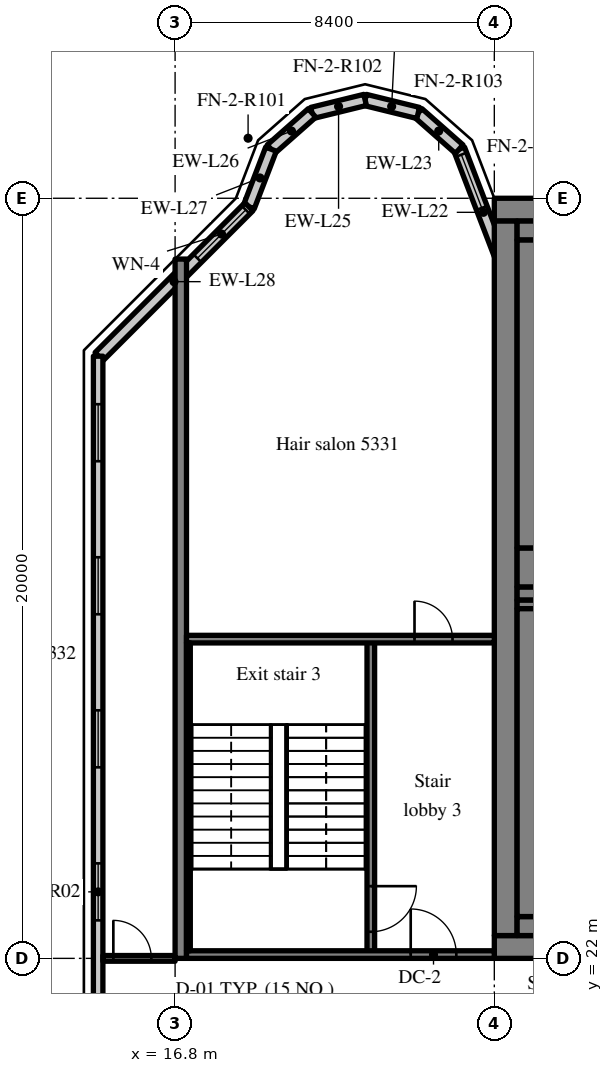
"""IFC4 building model, lengths in metres.
Left out: names, types, materials, properties, quantities, classifications, styles, units other than length and angle.
Written with IfcOpenShell. Run it as: python <this file> out.ifc"""

import sys

from ifc_helpers import new_model, si_unit, direction, frame, frame_2d, origin, place, context, subcontext, project, spatial, rectangle, extrude, source, transform, mapped, element, fill, save


model = new_model("IFC4")
c1 = context("Model", 3, precision=1e-05, world=origin(), true_north=direction((0.0, 1.0)))
c2 = subcontext(c1, "Body", "Model", "MODEL_VIEW")
j1 = project(units=[si_unit("LENGTHUNIT", "METRE"), si_unit("PLANEANGLEUNIT", "RADIAN")], contexts=[c1])
p1 = place(None, origin())
s1 = spatial("IfcSite", under=j1, at=p1, CompositionType="ELEMENT")
p2 = place(p1, origin())
s2 = spatial("IfcBuilding", under=s1, at=p2, CompositionType="ELEMENT")
p3 = place(p2, frame((0.0, 0.0, 221.8)))
s3 = spatial("IfcBuildingStorey", under=s2, at=p3, CompositionType="ELEMENT", Elevation=221.8)
m1 = source(origin(), c2, "Body", "SweptSolid", [
    extrude(rectangle(XDim=50.4, YDim=0.6, at=frame_2d((25.2, 0.0))), origin(), (0.0, 0.0, 1.0), 3.62),
])
p4 = place(p3, frame((25.2, 22.3, 0.0), z_axis=(0.0, 0.0, 1.0), x_axis=(1.0, 0.0, 0.0)))
e1 = element("IfcWall", 1, at=p4, inside=s3, PredefinedType="SHEAR", context=c2, shape_type="MappedRepresentation", body=[
    mapped(m1, transform((0.0, 0.0, 0.0), scale=1.0)),
])
m2 = source(origin(), c2, "Body", "SweptSolid", [
    extrude(rectangle(XDim=1.8, YDim=2.1, at=frame_2d((0.9, 1.05))), frame((0.0, 0.31, 0.0), z_axis=(0.0, -1.0, 0.0), x_axis=(1.0, 0.0, 0.0)), (0.0, 0.0, 1.0), 0.62),
])
p5 = place(p4, frame((15.9, 0.0, 0.0)))
e2 = element("IfcOpeningElement", 2, at=p5, cuts=e1, PredefinedType="OPENING", context=c2, shape_type="MappedRepresentation", body=[
    mapped(m2, transform((0.0, 0.0, 0.0), scale=1.0)),
])
m3 = source(origin(), c2, "Body", "SweptSolid", [
    extrude(rectangle(XDim=0.9, YDim=2.1, at=frame_2d((0.45, 1.05))), frame((0.0, 0.31, 0.0), z_axis=(0.0, -1.0, 0.0), x_axis=(1.0, 0.0, 0.0)), (0.0, 0.0, 1.0), 0.62),
])
p6 = place(p4, frame((9.687, 0.0, 0.0)))
e3 = element("IfcOpeningElement", 3, at=p6, cuts=e1, PredefinedType="OPENING", context=c2, shape_type="MappedRepresentation", body=[
    mapped(m3, transform((0.0, 0.0, 0.0), scale=1.0)),
])
p7 = place(p4, frame((21.513, 0.0, 0.0)))
e4 = element("IfcOpeningElement", 4, at=p7, cuts=e1, PredefinedType="OPENING", context=c2, shape_type="MappedRepresentation", body=[
    mapped(m3, transform((0.0, 0.0, 0.0), scale=1.0)),
])
p8 = place(p4, frame((32.7, 0.0, 0.0)))
e5 = element("IfcOpeningElement", 5, at=p8, cuts=e1, PredefinedType="OPENING", context=c2, shape_type="MappedRepresentation", body=[
    mapped(m2, transform((0.0, 0.0, 0.0), scale=1.0)),
])
m4 = source(origin(), c2, "Body", "SweptSolid", [
    extrude(rectangle(XDim=1.2, YDim=2.1, at=frame_2d((0.6, 1.05))), frame((0.0, 0.31, 0.0), z_axis=(0.0, -1.0, 0.0), x_axis=(1.0, 0.0, 0.0)), (0.0, 0.0, 1.0), 0.62),
])
p9 = place(p4, frame((6.488, 0.0, 0.0)))
e6 = element("IfcOpeningElement", 6, at=p9, cuts=e1, PredefinedType="OPENING", context=c2, shape_type="MappedRepresentation", body=[
    mapped(m4, transform((0.0, 0.0, 0.0), scale=1.0)),
])
p10 = place(p4, frame((47.925, 0.0, 0.0)))
e7 = element("IfcOpeningElement", 7, at=p10, cuts=e1, PredefinedType="OPENING", context=c2, shape_type="MappedRepresentation", body=[
    mapped(m4, transform((0.0, 0.0, 0.0), scale=1.0)),
])
p11 = place(p3, frame((25.2, 41.7, 0.0), z_axis=(0.0, 0.0, 1.0), x_axis=(1.0, 0.0, 0.0)))
e8 = element("IfcWall", 8, at=p11, inside=s3, PredefinedType="SHEAR", context=c2, shape_type="MappedRepresentation", body=[
    mapped(m1, transform((0.0, 0.0, 0.0), scale=1.0)),
])
m5 = source(origin(), c2, "Body", "SweptSolid", [
    extrude(rectangle(XDim=18.8, YDim=0.6, at=frame_2d((9.4, 0.0))), origin(), (0.0, 0.0, 1.0), 3.62),
])
p12 = place(p3, frame((25.5, 22.6, 0.0), z_axis=(0.0, 0.0, 1.0), x_axis=(0.0, 1.0, 0.0)))
e9 = element("IfcWall", 9, at=p12, inside=s3, PredefinedType="SHEAR", context=c2, shape_type="MappedRepresentation", body=[
    mapped(m5, transform((0.0, 0.0, 0.0), scale=1.0)),
])
m6 = source(origin(), c2, "Body", "SweptSolid", [
    extrude(rectangle(XDim=7.625, YDim=0.35, at=frame_2d((3.812, 0.0))), origin(), (0.0, 0.0, 1.0), 3.62),
])
p13 = place(p3, frame((25.8, 31.6, 0.0), z_axis=(0.0, 0.0, 1.0), x_axis=(1.0, 0.0, 0.0)))
e10 = element("IfcWall", 10, at=p13, inside=s3, PredefinedType="SHEAR", context=c2, shape_type="MappedRepresentation", body=[
    mapped(m6, transform((0.0, 0.0, 0.0), scale=1.0)),
])
m7 = source(origin(), c2, "Body", "SweptSolid", [
    extrude(rectangle(XDim=1.1, YDim=2.1, at=frame_2d((0.55, 1.05))), frame((0.0, 0.185, 0.0), z_axis=(0.0, -1.0, 0.0), x_axis=(1.0, 0.0, 0.0)), (0.0, 0.0, 1.0), 0.37),
])
p14 = place(p13, frame((5.938, 0.0, 0.0)))
e11 = element("IfcOpeningElement", 11, at=p14, cuts=e10, PredefinedType="OPENING", context=c2, shape_type="MappedRepresentation", body=[
    mapped(m7, transform((0.0, 0.0, 0.0), scale=1.0)),
])
m8 = source(origin(), c2, "Body", "SweptSolid", [
    extrude(rectangle(XDim=18.4, YDim=0.3, at=frame_2d((9.2, 0.0))), origin(), (0.0, 0.0, 1.0), 3.62),
])
p15 = place(p3, frame((16.95, 22.0, 0.0), z_axis=(0.0, 0.0, 1.0), x_axis=(0.0, 1.0, 0.0)))
e12 = element("IfcWall", 12, at=p15, inside=s3, PredefinedType="SHEAR", context=c2, shape_type="MappedRepresentation", body=[
    mapped(m8, transform((0.0, 0.0, 0.0), scale=1.0)),
])
m9 = source(origin(), c2, "Body", "SweptSolid", [
    extrude(rectangle(XDim=3.559, YDim=0.3, at=frame_2d((1.78, 0.0))), origin(), (0.0, 0.0, 1.0), 3.62),
])
p16 = place(p3, frame((25.55, 39.969, 0.0), z_axis=(0.0, 0.0, 1.0), x_axis=(-0.35779745313, 0.933799219604, 0.0)))
e13 = element("IfcWall", 13, at=p16, inside=s3, PredefinedType="SOLIDWALL", context=c2, shape_type="MappedRepresentation", body=[
    mapped(m9, transform((0.0, 0.0, 0.0), scale=1.0)),
])
m10 = source(origin(), c2, "Body", "SweptSolid", [
    extrude(rectangle(XDim=1.5, YDim=2.0, at=frame_2d((0.75, 1.0))), frame((0.0, 0.16, 0.0), z_axis=(0.0, -1.0, 0.0), x_axis=(1.0, 0.0, 0.0)), (0.0, 0.0, 1.0), 0.32),
])
p17 = place(p16, frame((1.903, 0.0, 0.9)))
e14 = element("IfcOpeningElement", 14, at=p17, cuts=e13, PredefinedType="OPENING", context=c2, shape_type="MappedRepresentation", body=[
    mapped(m10, transform((0.0, 0.0, 0.0), scale=1.0)),
])
m11 = source(origin(), c2, "Body", "SweptSolid", [
    extrude(rectangle(XDim=1.44, YDim=0.3, at=frame_2d((0.72, 0.0))), origin(), (0.0, 0.0, 1.0), 3.62),
])
p18 = place(p3, frame((24.277, 43.292, 0.0), z_axis=(0.0, 0.0, 1.0), x_axis=(-0.749649827867, 0.661834673902, 0.0)))
e15 = element("IfcWall", 15, at=p18, inside=s3, PredefinedType="SOLIDWALL", context=c2, shape_type="MappedRepresentation", body=[
    mapped(m11, transform((0.0, 0.0, 0.0), scale=1.0)),
])
m12 = source(origin(), c2, "Body", "SweptSolid", [
    extrude(rectangle(XDim=1.438, YDim=0.3, at=frame_2d((0.719, 0.0))), origin(), (0.0, 0.0, 1.0), 3.62),
])
p19 = place(p3, frame((23.197, 44.245, 0.0), z_axis=(0.0, 0.0, 1.0), x_axis=(-0.971152283879, 0.238460146601, 0.0)))
e16 = element("IfcWall", 16, at=p19, inside=s3, PredefinedType="SOLIDWALL", context=c2, shape_type="MappedRepresentation", body=[
    mapped(m12, transform((0.0, 0.0, 0.0), scale=1.0)),
])
m13 = source(origin(), c2, "Body", "SweptSolid", [
    extrude(rectangle(XDim=1.439, YDim=0.3, at=frame_2d((0.719, 0.0))), origin(), (0.0, 0.0, 1.0), 3.62),
])
p20 = place(p3, frame((21.8, 44.588, 0.0), z_axis=(0.0, 0.0, 1.0), x_axis=(-0.971161932466, -0.238420848351, 0.0)))
e17 = element("IfcWall", 17, at=p20, inside=s3, PredefinedType="SOLIDWALL", context=c2, shape_type="MappedRepresentation", body=[
    mapped(m13, transform((0.0, 0.0, 0.0), scale=1.0)),
])
m14 = source(origin(), c2, "Body", "SweptSolid", [
    extrude(rectangle(XDim=1.44, YDim=0.3, at=frame_2d((0.72, 0.0))), origin(), (0.0, 0.0, 1.0), 3.62),
])
p21 = place(p3, frame((20.403, 44.245, 0.0), z_axis=(0.0, 0.0, 1.0), x_axis=(-0.74957555648, -0.661918790432, 0.0)))
e18 = element("IfcWall", 18, at=p21, inside=s3, PredefinedType="SOLIDWALL", context=c2, shape_type="MappedRepresentation", body=[
    mapped(m14, transform((0.0, 0.0, 0.0), scale=1.0)),
])
m15 = source(origin(), c2, "Body", "SweptSolid", [
    extrude(rectangle(XDim=1.622, YDim=0.3, at=frame_2d((0.811, 0.0))), origin(), (0.0, 0.0, 1.0), 3.62),
])
p22 = place(p3, frame((19.323, 43.292, 0.0), z_axis=(0.0, 0.0, 1.0), x_axis=(-0.357778527068, -0.933806471154, 0.0)))
e19 = element("IfcWall", 19, at=p22, inside=s3, PredefinedType="SOLIDWALL", context=c2, shape_type="MappedRepresentation", body=[
    mapped(m15, transform((0.0, 0.0, 0.0), scale=1.0)),
])
m16 = source(origin(), c2, "Body", "SweptSolid", [
    extrude(rectangle(XDim=5.576, YDim=0.3, at=frame_2d((2.788, 0.0))), origin(), (0.0, 0.0, 1.0), 3.62),
])
p23 = place(p3, frame((18.743, 41.777, 0.0), z_axis=(0.0, 0.0, 1.0), x_axis=(-0.707106781187, -0.707106781187, 0.0)))
e20 = element("IfcWall", 20, at=p23, inside=s3, PredefinedType="SOLIDWALL", context=c2, shape_type="MappedRepresentation", body=[
    mapped(m16, transform((0.0, 0.0, 0.0), scale=1.0)),
])
m17 = source(origin(), c2, "Body", "SweptSolid", [
    extrude(rectangle(XDim=1.8, YDim=1.5, at=frame_2d((0.9, 0.75))), frame((0.0, 0.16, 0.0), z_axis=(0.0, -1.0, 0.0), x_axis=(1.0, 0.0, 0.0)), (0.0, 0.0, 1.0), 0.32),
])
p24 = place(p23, frame((0.118, 0.0, 0.9)))
e21 = element("IfcOpeningElement", 21, at=p24, cuts=e20, PredefinedType="OPENING", context=c2, shape_type="MappedRepresentation", body=[
    mapped(m17, transform((0.0, 0.0, 0.0), scale=1.0)),
])
m18 = source(origin(), c2, "Body", "SweptSolid", [
    extrude(rectangle(XDim=28.189, YDim=0.25, at=frame_2d((14.095, 0.0))), origin(), (0.0, 0.0, 1.0), 3.62),
])
p25 = place(p3, frame((14.775, 37.845, 0.0), z_axis=(0.0, 0.0, 1.0), x_axis=(0.0, -1.0, 0.0)))
e22 = element("IfcWall", 22, at=p25, inside=s3, PredefinedType="SOLIDWALL", context=c2, shape_type="MappedRepresentation", body=[
    mapped(m18, transform((0.0, 0.0, 0.0), scale=1.0)),
])
m19 = source(origin(), c2, "Body", "SweptSolid", [
    extrude(rectangle(XDim=1.5, YDim=1.5, at=frame_2d((0.75, 0.75))), frame((0.0, 0.135, 0.0), z_axis=(0.0, -1.0, 0.0), x_axis=(1.0, 0.0, 0.0)), (0.0, 0.0, 1.0), 0.27),
])
p26 = place(p25, frame((1.263, 0.0, 0.9)))
e23 = element("IfcOpeningElement", 23, at=p26, cuts=e22, PredefinedType="OPENING", context=c2, shape_type="MappedRepresentation", body=[
    mapped(m19, transform((0.0, 0.0, 0.0), scale=1.0)),
])
p27 = place(p25, frame((5.291, 0.0, 0.9)))
e24 = element("IfcOpeningElement", 24, at=p27, cuts=e22, PredefinedType="OPENING", context=c2, shape_type="MappedRepresentation", body=[
    mapped(m19, transform((0.0, 0.0, 0.0), scale=1.0)),
])
p28 = place(p25, frame((9.318, 0.0, 0.9)))
e25 = element("IfcOpeningElement", 25, at=p28, cuts=e22, PredefinedType="OPENING", context=c2, shape_type="MappedRepresentation", body=[
    mapped(m19, transform((0.0, 0.0, 0.0), scale=1.0)),
])
p29 = place(p25, frame((13.345, 0.0, 0.9)))
e26 = element("IfcOpeningElement", 26, at=p29, cuts=e22, PredefinedType="OPENING", context=c2, shape_type="MappedRepresentation", body=[
    mapped(m19, transform((0.0, 0.0, 0.0), scale=1.0)),
])
p30 = place(p25, frame((17.372, 0.0, 0.9)))
e27 = element("IfcOpeningElement", 27, at=p30, cuts=e22, PredefinedType="OPENING", context=c2, shape_type="MappedRepresentation", body=[
    mapped(m19, transform((0.0, 0.0, 0.0), scale=1.0)),
])
p31 = place(p25, frame((21.399, 0.0, 0.9)))
e28 = element("IfcOpeningElement", 28, at=p31, cuts=e22, PredefinedType="OPENING", context=c2, shape_type="MappedRepresentation", body=[
    mapped(m19, transform((0.0, 0.0, 0.0), scale=1.0)),
])
p32 = place(p25, frame((25.426, 0.0, 0.9)))
e29 = element("IfcOpeningElement", 29, at=p32, cuts=e22, PredefinedType="OPENING", context=c2, shape_type="MappedRepresentation", body=[
    mapped(m19, transform((0.0, 0.0, 0.0), scale=1.0)),
])
m20 = source(origin(), c2, "Body", "SweptSolid", [
    extrude(rectangle(XDim=8.3, YDim=0.2, at=frame_2d((4.15, 0.0))), origin(), (0.0, 0.0, 1.0), 3.62),
])
p33 = place(p3, frame((21.95, 22.1, 0.0), z_axis=(0.0, 0.0, 1.0), x_axis=(0.0, 1.0, 0.0)))
e30 = element("IfcWall", 30, at=p33, inside=s3, PredefinedType="SOLIDWALL", context=c2, shape_type="MappedRepresentation", body=[
    mapped(m20, transform((0.0, 0.0, 0.0), scale=1.0)),
])
m21 = source(origin(), c2, "Body", "SweptSolid", [
    extrude(rectangle(XDim=1.2, YDim=2.1, at=frame_2d((0.6, 1.05))), frame((0.0, 0.11, 0.0), z_axis=(0.0, -1.0, 0.0), x_axis=(1.0, 0.0, 0.0)), (0.0, 0.0, 1.0), 0.22),
])
p34 = place(p33, frame((0.6, 0.0, 0.0)))
e31 = element("IfcOpeningElement", 31, at=p34, cuts=e30, PredefinedType="OPENING", context=c2, shape_type="MappedRepresentation", body=[
    mapped(m21, transform((0.0, 0.0, 0.0), scale=1.0)),
])
m22 = source(origin(), c2, "Body", "SweptSolid", [
    extrude(rectangle(XDim=8.1, YDim=0.2, at=frame_2d((4.05, 0.0))), origin(), (0.0, 0.0, 1.0), 3.62),
])
p35 = place(p3, frame((17.1, 22.1, 0.0), z_axis=(0.0, 0.0, 1.0), x_axis=(1.0, 0.0, 0.0)))
e32 = element("IfcWall", 32, at=p35, inside=s3, PredefinedType="SOLIDWALL", context=c2, shape_type="MappedRepresentation", body=[
    mapped(m22, transform((0.0, 0.0, 0.0), scale=1.0)),
])
p36 = place(p35, frame((5.9, 0.0, 0.0)))
e33 = element("IfcOpeningElement", 33, at=p36, cuts=e32, PredefinedType="OPENING", context=c2, shape_type="MappedRepresentation", body=[
    mapped(m21, transform((0.0, 0.0, 0.0), scale=1.0)),
])
p37 = place(p3, frame((17.1, 30.4, 0.0), z_axis=(0.0, 0.0, 1.0), x_axis=(1.0, 0.0, 0.0)))
e34 = element("IfcWall", 34, at=p37, inside=s3, PredefinedType="SOLIDWALL", context=c2, shape_type="MappedRepresentation", body=[
    mapped(m22, transform((0.0, 0.0, 0.0), scale=1.0)),
])
m23 = source(origin(), c2, "Body", "SweptSolid", [
    extrude(rectangle(XDim=1.0, YDim=2.1, at=frame_2d((0.5, 1.05))), frame((0.0, 0.11, 0.0), z_axis=(0.0, -1.0, 0.0), x_axis=(1.0, 0.0, 0.0)), (0.0, 0.0, 1.0), 0.22),
])
p38 = place(p37, frame((6.0, 0.0, 0.0)))
e35 = element("IfcOpeningElement", 35, at=p38, cuts=e34, PredefinedType="OPENING", context=c2, shape_type="MappedRepresentation", body=[
    mapped(m23, transform((0.0, 0.0, 0.0), scale=1.0)),
])
m24 = source(origin(), c2, "Body", "SweptSolid", [
    extrude(rectangle(XDim=5.15, YDim=0.5, at=frame_2d((2.575, 0.0))), origin(), (0.0, 0.0, 1.0), 3.62),
])
p39 = place(p3, frame((25.8, 22.85, 0.0), z_axis=(0.0, 0.0, 1.0), x_axis=(1.0, 0.0, 0.0)))
e36 = element("IfcWall", 36, at=p39, inside=s3, PredefinedType="SOLIDWALL", context=c2, shape_type="MappedRepresentation", body=[
    mapped(m24, transform((0.0, 0.0, 0.0), scale=1.0)),
])
m25 = source(origin(), c2, "Body", "SweptSolid", [
    extrude(rectangle(XDim=5.15, YDim=0.225, at=frame_2d((2.575, 0.0))), origin(), (0.0, 0.0, 1.0), 3.62),
])
p40 = place(p3, frame((25.8, 31.312, 0.0), z_axis=(0.0, 0.0, 1.0), x_axis=(1.0, 0.0, 0.0)))
e37 = element("IfcWall", 37, at=p40, inside=s3, PredefinedType="SOLIDWALL", context=c2, shape_type="MappedRepresentation", body=[
    mapped(m25, transform((0.0, 0.0, 0.0), scale=1.0)),
])
m26 = source(origin(), c2, "Body", "SweptSolid", [
    extrude(rectangle(XDim=8.1, YDim=0.5, at=frame_2d((4.05, 0.0))), origin(), (0.0, 0.0, 1.0), 3.62),
])
p41 = place(p3, frame((26.05, 23.1, 0.0), z_axis=(0.0, 0.0, 1.0), x_axis=(0.0, 1.0, 0.0)))
e38 = element("IfcWall", 38, at=p41, inside=s3, PredefinedType="SOLIDWALL", context=c2, shape_type="MappedRepresentation", body=[
    mapped(m26, transform((0.0, 0.0, 0.0), scale=1.0)),
])
m27 = source(origin(), c2, "Body", "SweptSolid", [
    extrude(rectangle(XDim=8.1, YDim=0.1, at=frame_2d((4.05, 0.0))), origin(), (0.0, 0.0, 1.0), 3.62),
])
p42 = place(p3, frame((17.15, 22.2, 0.0), z_axis=(0.0, 0.0, 1.0), x_axis=(0.0, 1.0, 0.0)))
e39 = element("IfcWall", 39, at=p42, inside=s3, PredefinedType="SOLIDWALL", context=c2, shape_type="MappedRepresentation", body=[
    mapped(m27, transform((0.0, 0.0, 0.0), scale=1.0)),
])
p43 = place(p3, frame((25.8, 41.15, 0.0), z_axis=(0.0, 0.0, 1.0), x_axis=(1.0, 0.0, 0.0)))
e40 = element("IfcWall", 40, at=p43, inside=s3, PredefinedType="SOLIDWALL", context=c2, shape_type="MappedRepresentation", body=[
    mapped(m24, transform((0.0, 0.0, 0.0), scale=1.0)),
])
m28 = source(origin(), c2, "Body", "SweptSolid", [
    extrude(rectangle(XDim=5.15, YDim=1.025, at=frame_2d((2.575, 0.0))), origin(), (0.0, 0.0, 1.0), 3.62),
])
p44 = place(p3, frame((25.8, 32.287, 0.0), z_axis=(0.0, 0.0, 1.0), x_axis=(1.0, 0.0, 0.0)))
e41 = element("IfcWall", 41, at=p44, inside=s3, PredefinedType="SOLIDWALL", context=c2, shape_type="MappedRepresentation", body=[
    mapped(m28, transform((0.0, 0.0, 0.0), scale=1.0)),
])
p45 = place(p3, frame((26.05, 32.8, 0.0), z_axis=(0.0, 0.0, 1.0), x_axis=(0.0, 1.0, 0.0)))
e42 = element("IfcWall", 42, at=p45, inside=s3, PredefinedType="SOLIDWALL", context=c2, shape_type="MappedRepresentation", body=[
    mapped(m26, transform((0.0, 0.0, 0.0), scale=1.0)),
])
m29 = source(origin(), c2, "Body", "SweptSolid", [
    extrude(rectangle(XDim=1.9, YDim=0.15, at=frame_2d((0.95, 0.0))), origin(), (0.0, 0.0, 1.0), 2.92),
])
p46 = place(p3, frame((14.9, 22.0, 0.0), z_axis=(0.0, 0.0, 1.0), x_axis=(1.0, 0.0, 0.0)))
e43 = element("IfcWall", 43, at=p46, inside=s3, PredefinedType="PARTITIONING", context=c2, shape_type="MappedRepresentation", body=[
    mapped(m29, transform((0.0, 0.0, 0.0), scale=1.0)),
])
m30 = source(origin(), c2, "Body", "SweptSolid", [
    extrude(rectangle(XDim=1.0, YDim=2.1, at=frame_2d((0.5, 1.05))), frame((0.0, 0.085, 0.0), z_axis=(0.0, -1.0, 0.0), x_axis=(1.0, 0.0, 0.0)), (0.0, 0.0, 1.0), 0.17),
])
p47 = place(p46, frame((0.275, 0.0, 0.0)))
e44 = element("IfcOpeningElement", 44, at=p47, cuts=e43, PredefinedType="OPENING", context=c2, shape_type="MappedRepresentation", body=[
    mapped(m30, transform((0.0, 0.0, 0.0), scale=1.0)),
])
m31 = source(origin(), c2, "Body", "SweptSolid", [
    extrude(rectangle(XDim=1.5, YDim=2.0, at=frame_2d((0.75, 1.0))), frame((0.0, 0.03, 0.0), z_axis=(0.0, -1.0, 0.0), x_axis=(1.0, 0.0, 0.0)), (0.0, 0.0, 1.0), 0.06),
])
p48 = place(p17, origin())
e45 = element("IfcWindow", 45, at=p48, inside=s3, PartitioningType="SINGLE_PANEL", PredefinedType="WINDOW", context=c2, shape_type="MappedRepresentation", body=[
    mapped(m31, transform((0.0, 0.0, 0.0), scale=1.0)),
])
fill(e14, e45)
m32 = source(origin(), c2, "Body", "SweptSolid", [
    extrude(rectangle(XDim=1.8, YDim=1.5, at=frame_2d((0.9, 0.75))), frame((0.0, 0.03, 0.0), z_axis=(0.0, -1.0, 0.0), x_axis=(1.0, 0.0, 0.0)), (0.0, 0.0, 1.0), 0.06),
])
p49 = place(p24, origin())
e46 = element("IfcWindow", 46, at=p49, inside=s3, PartitioningType="SINGLE_PANEL", PredefinedType="WINDOW", context=c2, shape_type="MappedRepresentation", body=[
    mapped(m32, transform((0.0, 0.0, 0.0), scale=1.0)),
])
fill(e21, e46)
m33 = source(origin(), c2, "Body", "SweptSolid", [
    extrude(rectangle(XDim=1.5, YDim=1.5, at=frame_2d((0.75, 0.75))), frame((0.0, 0.03, 0.0), z_axis=(0.0, -1.0, 0.0), x_axis=(1.0, 0.0, 0.0)), (0.0, 0.0, 1.0), 0.06),
])
p50 = place(p26, origin())
e47 = element("IfcWindow", 47, at=p50, inside=s3, PartitioningType="SINGLE_PANEL", PredefinedType="WINDOW", context=c2, shape_type="MappedRepresentation", body=[
    mapped(m33, transform((0.0, 0.0, 0.0), scale=1.0)),
])
fill(e23, e47)
p51 = place(p27, origin())
e48 = element("IfcWindow", 48, at=p51, inside=s3, PartitioningType="SINGLE_PANEL", PredefinedType="WINDOW", context=c2, shape_type="MappedRepresentation", body=[
    mapped(m33, transform((0.0, 0.0, 0.0), scale=1.0)),
])
fill(e24, e48)
p52 = place(p28, origin())
e49 = element("IfcWindow", 49, at=p52, inside=s3, PartitioningType="SINGLE_PANEL", PredefinedType="WINDOW", context=c2, shape_type="MappedRepresentation", body=[
    mapped(m33, transform((0.0, 0.0, 0.0), scale=1.0)),
])
fill(e25, e49)
p53 = place(p29, origin())
e50 = element("IfcWindow", 50, at=p53, inside=s3, PartitioningType="SINGLE_PANEL", PredefinedType="WINDOW", context=c2, shape_type="MappedRepresentation", body=[
    mapped(m33, transform((0.0, 0.0, 0.0), scale=1.0)),
])
fill(e26, e50)
m34 = source(origin(), c2, "Body", "SweptSolid", [
    extrude(rectangle(XDim=1.2, YDim=2.1, at=frame_2d((0.6, 1.05))), frame((0.0, 0.025, 0.0), z_axis=(0.0, -1.0, 0.0), x_axis=(1.0, 0.0, 0.0)), (0.0, 0.0, 1.0), 0.05),
])
p54 = place(p34, origin())
e51 = element("IfcDoor", 51, at=p54, inside=s3, OperationType="SINGLE_SWING_RIGHT", PredefinedType="DOOR", context=c2, shape_type="MappedRepresentation", body=[
    mapped(m34, transform((0.0, 0.0, 0.0), scale=1.0)),
])
fill(e31, e51)
p55 = place(p36, origin())
e52 = element("IfcDoor", 52, at=p55, inside=s3, OperationType="SINGLE_SWING_LEFT", PredefinedType="DOOR", context=c2, shape_type="MappedRepresentation", body=[
    mapped(m34, transform((0.0, 0.0, 0.0), scale=1.0)),
])
fill(e33, e52)
m35 = source(origin(), c2, "Body", "SweptSolid", [
    extrude(rectangle(XDim=1.0, YDim=2.1, at=frame_2d((0.5, 1.05))), frame((0.0, 0.025, 0.0), z_axis=(0.0, -1.0, 0.0), x_axis=(1.0, 0.0, 0.0)), (0.0, 0.0, 1.0), 0.05),
])
p56 = place(p38, origin())
e53 = element("IfcDoor", 53, at=p56, inside=s3, OperationType="SINGLE_SWING_LEFT", PredefinedType="DOOR", context=c2, shape_type="MappedRepresentation", body=[
    mapped(m35, transform((0.0, 0.0, 0.0), scale=1.0)),
])
fill(e35, e53)
p57 = place(p47, origin())
e54 = element("IfcDoor", 54, at=p57, inside=s3, OperationType="SINGLE_SWING_LEFT", PredefinedType="DOOR", context=c2, shape_type="MappedRepresentation", body=[
    mapped(m35, transform((0.0, 0.0, 0.0), scale=1.0)),
])
fill(e44, e54)
save(model, sys.argv[1])
